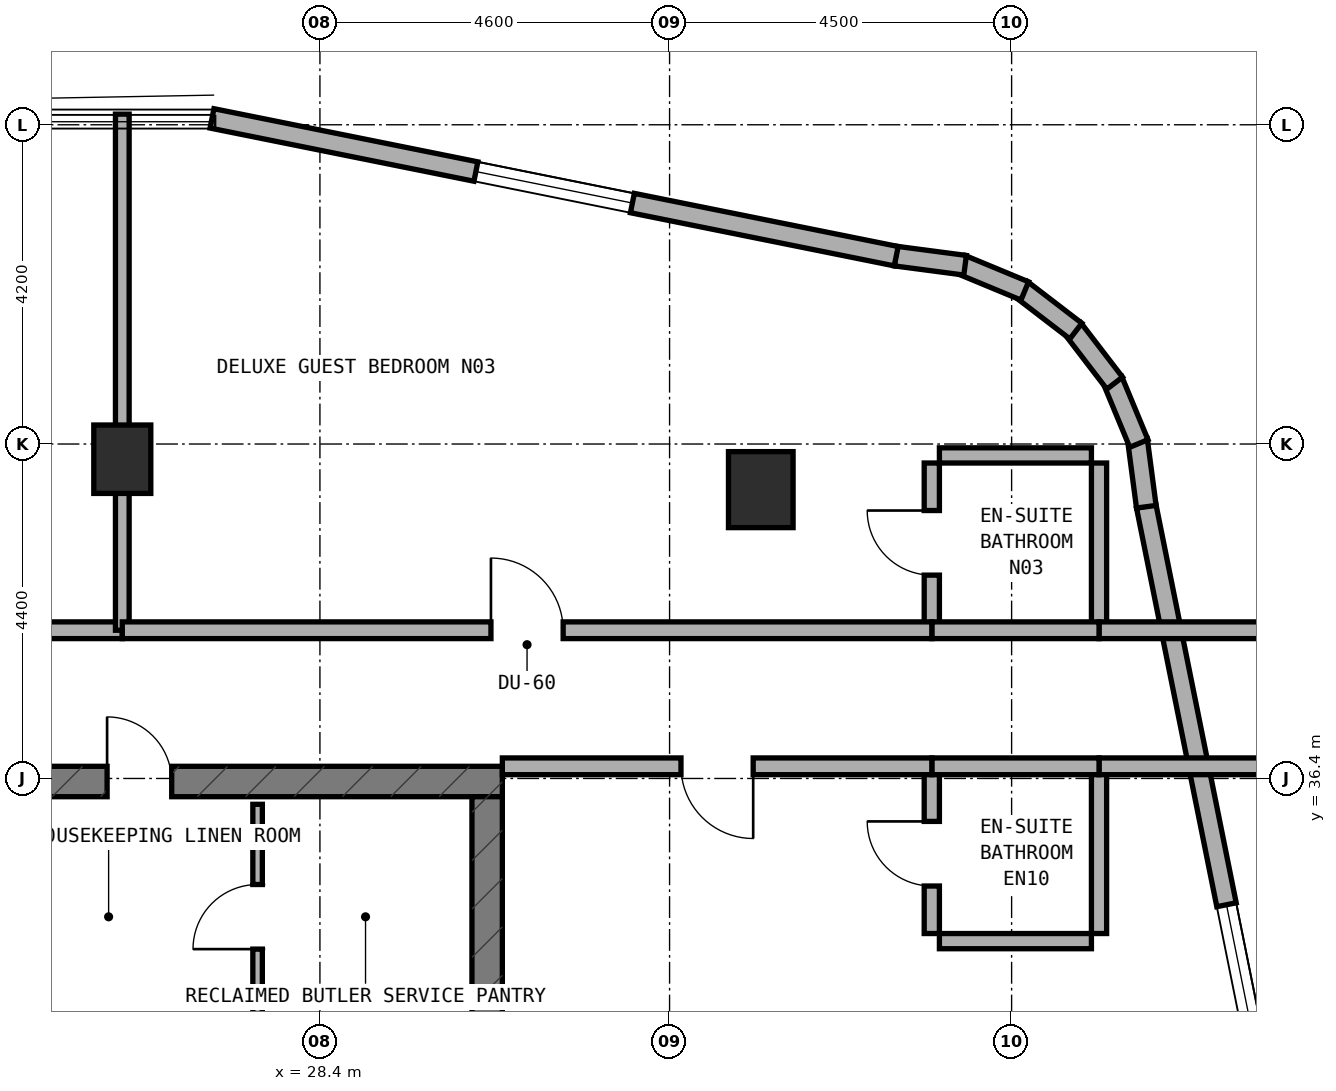
"""IFC4 building model, lengths in metres.
Left out: names, types, materials, properties, quantities, classifications, styles, units other than length and angle.
Written with IfcOpenShell. Run it as: python <this file> out.ifc"""

import sys

from ifc_helpers import new_model, si_unit, direction, frame, frame_2d, origin, origin_2d, place, context, subcontext, project, spatial, rectangle, extrude, element, fill, save


model = new_model("IFC4")
c1 = context("Model", 3, precision=1e-05, world=origin(), true_north=direction((0.0, 1.0)))
c2 = subcontext(c1, "Body", "Model", "MODEL_VIEW")
j1 = project(units=[si_unit("LENGTHUNIT", "METRE"), si_unit("PLANEANGLEUNIT", "RADIAN")], contexts=[c1])
p1 = place(None, origin())
s1 = spatial("IfcSite", under=j1, at=p1, CompositionType="ELEMENT")
p2 = place(p1, origin())
s2 = spatial("IfcBuilding", under=s1, at=p2, CompositionType="ELEMENT")
p3 = place(p2, frame((0.0, 0.0, 145.0)))
s3 = spatial("IfcBuildingStorey", under=s2, at=p3, CompositionType="ELEMENT", Elevation=145.0)
p4 = place(p3, frame((6.4, 36.36, 0.0), z_axis=(0.0, 0.0, 1.0), x_axis=(1.0, 0.0, 0.0)))
e1 = element("IfcWall", 1, at=p4, inside=s3, PredefinedType="SHEAR", context=c2, shape_type="SweptSolid", body=[
    extrude(rectangle(XDim=24.4, YDim=0.4, at=frame_2d((12.2, 0.0))), origin(), (0.0, 0.0, 1.0), 3.5),
])
p5 = place(p4, frame((9.15, 0.0, 0.0)))
e2 = element("IfcOpeningElement", 2, at=p5, cuts=e1, PredefinedType="OPENING", context=c2, shape_type="SweptSolid", body=[
    extrude(rectangle(XDim=1.2, YDim=2.15, at=frame_2d((0.6, 1.075))), frame((0.0, 0.21, 0.0), z_axis=(0.0, -1.0, 0.0), x_axis=(1.0, 0.0, 0.0)), (0.0, 0.0, 1.0), 0.42),
])
p6 = place(p4, frame((19.2, 0.0, 0.0)))
e3 = element("IfcOpeningElement", 3, at=p6, cuts=e1, PredefinedType="OPENING", context=c2, shape_type="SweptSolid", body=[
    extrude(rectangle(XDim=0.85, YDim=2.1, at=frame_2d((0.425, 1.05))), frame((0.0, 0.21, 0.0), z_axis=(0.0, -1.0, 0.0), x_axis=(1.0, 0.0, 0.0)), (0.0, 0.0, 1.0), 0.42),
])
p7 = place(p4, frame((17.22, 0.0, 0.0)))
e4 = element("IfcOpeningElement", 4, at=p7, cuts=e1, PredefinedType="OPENING", context=c2, shape_type="SweptSolid", body=[
    extrude(rectangle(XDim=0.85, YDim=2.1, at=frame_2d((0.425, 1.05))), frame((0.0, 0.21, 0.0), z_axis=(0.0, -1.0, 0.0), x_axis=(1.0, 0.0, 0.0)), (0.0, 0.0, 1.0), 0.42),
])
p8 = place(p3, frame((30.6, 33.0, 0.0), z_axis=(0.0, 0.0, 1.0), x_axis=(0.0, 1.0, 0.0)))
e5 = element("IfcWall", 5, at=p8, inside=s3, PredefinedType="SHEAR", context=c2, shape_type="SweptSolid", body=[
    extrude(rectangle(XDim=3.16, YDim=0.4, at=frame_2d((1.58, 0.0))), origin(), (0.0, 0.0, 1.0), 3.5),
])
p9 = place(p3, frame((25.8, 40.6, 0.0), z_axis=(0.0, 0.0, 1.0), x_axis=(1.0, 0.0, 0.0)))
e6 = element("IfcColumn", 6, at=p9, inside=s3, PredefinedType="COLUMN", context=c2, shape_type="SweptSolid", body=[
    extrude(rectangle(XDim=0.75, YDim=0.9, at=origin_2d()), origin(), (0.0, 0.0, 1.0), 3.5),
])
p10 = place(p3, frame((34.2, 40.2, 0.0), z_axis=(0.0, 0.0, 1.0), x_axis=(1.0, 0.0, 0.0)))
e7 = element("IfcColumn", 7, at=p10, inside=s3, PredefinedType="COLUMN", context=c2, shape_type="SweptSolid", body=[
    extrude(rectangle(XDim=0.85, YDim=1.0, at=origin_2d()), origin(), (0.0, 0.0, 1.0), 3.5),
])
p11 = place(p3, frame((41.084, 30.98, 0.0), z_axis=(0.0, 0.0, 1.0), x_axis=(-0.197435082048, 0.980315963543, 0.0)))
e8 = element("IfcWall", 8, at=p11, inside=s3, PredefinedType="STANDARD", context=c2, shape_type="SweptSolid", body=[
    extrude(rectangle(XDim=9.183, YDim=0.26, at=frame_2d((4.591, 0.0))), origin(), (0.0, 0.0, 1.0), 3.22),
])
p12 = place(p11, frame((1.734, 0.0, 0.85)))
e9 = element("IfcOpeningElement", 9, at=p12, cuts=e8, PredefinedType="OPENING", context=c2, shape_type="SweptSolid", body=[
    extrude(rectangle(XDim=2.1, YDim=1.5, at=frame_2d((1.05, 0.75))), frame((0.0, 0.14, 0.0), z_axis=(0.0, -1.0, 0.0), x_axis=(1.0, 0.0, 0.0)), (0.0, 0.0, 1.0), 0.28),
])
p13 = place(p3, frame((39.272, 39.975, 0.0), z_axis=(0.0, 0.0, 1.0), x_axis=(-0.130953706898, 0.991388484223, 0.0)))
e10 = element("IfcWall", 10, at=p13, inside=s3, PredefinedType="STANDARD", context=c2, shape_type="SweptSolid", body=[
    extrude(rectangle(XDim=0.885, YDim=0.26, at=frame_2d((0.443, 0.0))), origin(), (0.0, 0.0, 1.0), 3.22),
])
p14 = place(p3, frame((39.174, 40.807, 0.0), z_axis=(0.0, 0.0, 1.0), x_axis=(-0.383290660547, 0.923627776508, 0.0)))
e11 = element("IfcWall", 11, at=p14, inside=s3, PredefinedType="STANDARD", context=c2, shape_type="SweptSolid", body=[
    extrude(rectangle(XDim=0.903, YDim=0.26, at=frame_2d((0.452, 0.0))), origin(), (0.0, 0.0, 1.0), 3.22),
])
p15 = place(p3, frame((38.856, 41.601, 0.0), z_axis=(0.0, 0.0, 1.0), x_axis=(-0.608624690463, 0.793458244748, 0.0)))
e12 = element("IfcWall", 12, at=p15, inside=s3, PredefinedType="STANDARD", context=c2, shape_type="SweptSolid", body=[
    extrude(rectangle(XDim=0.902, YDim=0.26, at=frame_2d((0.451, 0.0))), origin(), (0.0, 0.0, 1.0), 3.22),
])
p16 = place(p3, frame((38.345, 42.286, 0.0), z_axis=(0.0, 0.0, 1.0), x_axis=(-0.793558456666, 0.608494022858, 0.0)))
e13 = element("IfcWall", 13, at=p16, inside=s3, PredefinedType="STANDARD", context=c2, shape_type="SweptSolid", body=[
    extrude(rectangle(XDim=0.902, YDim=0.26, at=frame_2d((0.451, 0.0))), origin(), (0.0, 0.0, 1.0), 3.22),
])
p17 = place(p3, frame((37.673, 42.814, 0.0), z_axis=(0.0, 0.0, 1.0), x_axis=(-0.923683767999, 0.383155708213, 0.0)))
e14 = element("IfcWall", 14, at=p17, inside=s3, PredefinedType="STANDARD", context=c2, shape_type="SweptSolid", body=[
    extrude(rectangle(XDim=0.903, YDim=0.26, at=frame_2d((0.451, 0.0))), origin(), (0.0, 0.0, 1.0), 3.22),
])
p18 = place(p3, frame((36.888, 43.152, 0.0), z_axis=(0.0, 0.0, 1.0), x_axis=(-0.991487658083, 0.130200706103, 0.0)))
e15 = element("IfcWall", 15, at=p18, inside=s3, PredefinedType="STANDARD", context=c2, shape_type="SweptSolid", body=[
    extrude(rectangle(XDim=0.921, YDim=0.26, at=frame_2d((0.46, 0.0))), origin(), (0.0, 0.0, 1.0), 3.22),
])
p19 = place(p3, frame((35.982, 43.271, 0.0), z_axis=(0.0, 0.0, 1.0), x_axis=(-0.980315963543, 0.197435082048, 0.0)))
e16 = element("IfcWall", 16, at=p19, inside=s3, PredefinedType="STANDARD", context=c2, shape_type="SweptSolid", body=[
    extrude(rectangle(XDim=9.183, YDim=0.26, at=frame_2d((4.591, 0.0))), origin(), (0.0, 0.0, 1.0), 3.22),
])
p20 = place(p19, frame((3.541, 0.0, 0.85)))
e17 = element("IfcOpeningElement", 17, at=p20, cuts=e16, PredefinedType="OPENING", context=c2, shape_type="SweptSolid", body=[
    extrude(rectangle(XDim=2.1, YDim=1.5, at=frame_2d((1.05, 0.75))), frame((0.0, 0.14, 0.0), z_axis=(0.0, -1.0, 0.0), x_axis=(1.0, 0.0, 0.0)), (0.0, 0.0, 1.0), 0.28),
])
p21 = place(p3, frame((27.58, 33.1, 0.0), z_axis=(0.0, 0.0, 1.0), x_axis=(0.0, 1.0, 0.0)))
e18 = element("IfcWall", 18, at=p21, inside=s3, PredefinedType="PARTITIONING", context=c2, shape_type="SweptSolid", body=[
    extrude(rectangle(XDim=2.96, YDim=0.125, at=frame_2d((1.48, 0.0))), origin(), (0.0, 0.0, 1.0), 2.795),
])
p22 = place(p21, frame((1.055, 0.0, 0.0)))
e19 = element("IfcOpeningElement", 19, at=p22, cuts=e18, PredefinedType="OPENING", context=c2, shape_type="SweptSolid", body=[
    extrude(rectangle(XDim=0.85, YDim=2.1, at=frame_2d((0.425, 1.05))), frame((0.0, 0.073, 0.0), z_axis=(0.0, -1.0, 0.0), x_axis=(1.0, 0.0, 0.0)), (0.0, 0.0, 1.0), 0.145),
])
p23 = place(p3, frame((18.4, 38.35, 0.0), z_axis=(0.0, 0.0, 1.0), x_axis=(1.0, 0.0, 0.0)))
e20 = element("IfcWall", 20, at=p23, inside=s3, PredefinedType="SOLIDWALL", context=c2, shape_type="SweptSolid", body=[
    extrude(rectangle(XDim=7.4, YDim=0.22, at=frame_2d((3.7, 0.0))), origin(), (0.0, 0.0, 1.0), 2.795),
])
p24 = place(p23, frame((3.225, 0.0, 0.0)))
e21 = element("IfcOpeningElement", 21, at=p24, cuts=e20, PredefinedType="OPENING", context=c2, shape_type="SweptSolid", body=[
    extrude(rectangle(XDim=0.95, YDim=2.1, at=frame_2d((0.475, 1.05))), frame((0.0, 0.12, 0.0), z_axis=(0.0, -1.0, 0.0), x_axis=(1.0, 0.0, 0.0)), (0.0, 0.0, 1.0), 0.24),
])
p25 = place(p3, frame((25.8, 38.35, 0.0), z_axis=(0.0, 0.0, 1.0), x_axis=(0.0, 1.0, 0.0)))
e22 = element("IfcWall", 22, at=p25, inside=s3, PredefinedType="SOLIDWALL", context=c2, shape_type="SweptSolid", body=[
    extrude(rectangle(XDim=6.79, YDim=0.18, at=frame_2d((3.395, 0.0))), origin(), (0.0, 0.0, 1.0), 2.795),
])
p26 = place(p3, frame((36.45, 38.45, 0.0), z_axis=(0.0, 0.0, 1.0), x_axis=(0.0, 1.0, 0.0)))
e23 = element("IfcWall", 23, at=p26, inside=s3, PredefinedType="PLUMBINGWALL", context=c2, shape_type="SweptSolid", body=[
    extrude(rectangle(XDim=2.1, YDim=0.2, at=frame_2d((1.05, 0.0))), origin(), (0.0, 0.0, 1.0), 3.22),
])
p27 = place(p26, frame((0.625, 0.0, 0.0)))
e24 = element("IfcOpeningElement", 24, at=p27, cuts=e23, PredefinedType="OPENING", context=c2, shape_type="SweptSolid", body=[
    extrude(rectangle(XDim=0.85, YDim=2.1, at=frame_2d((0.425, 1.05))), frame((0.0, 0.11, 0.0), z_axis=(0.0, -1.0, 0.0), x_axis=(1.0, 0.0, 0.0)), (0.0, 0.0, 1.0), 0.22),
])
p28 = place(p3, frame((36.55, 40.65, 0.0), z_axis=(0.0, 0.0, 1.0), x_axis=(1.0, 0.0, 0.0)))
e25 = element("IfcWall", 25, at=p28, inside=s3, PredefinedType="PLUMBINGWALL", context=c2, shape_type="SweptSolid", body=[
    extrude(rectangle(XDim=2.0, YDim=0.2, at=frame_2d((1.0, 0.0))), origin(), (0.0, 0.0, 1.0), 3.22),
])
p29 = place(p3, frame((38.65, 38.45, 0.0), z_axis=(0.0, 0.0, 1.0), x_axis=(0.0, 1.0, 0.0)))
e26 = element("IfcWall", 26, at=p29, inside=s3, PredefinedType="PLUMBINGWALL", context=c2, shape_type="SweptSolid", body=[
    extrude(rectangle(XDim=2.1, YDim=0.2, at=frame_2d((1.05, 0.0))), origin(), (0.0, 0.0, 1.0), 3.22),
])
p30 = place(p3, frame((38.65, 38.35, 0.0), z_axis=(0.0, 0.0, 1.0), x_axis=(1.0, 0.0, 0.0)))
e27 = element("IfcWall", 27, at=p30, inside=s3, PredefinedType="SOLIDWALL", context=c2, shape_type="SweptSolid", body=[
    extrude(rectangle(XDim=2.39, YDim=0.22, at=frame_2d((1.195, 0.0))), origin(), (0.0, 0.0, 1.0), 3.22),
])
p31 = place(p3, frame((36.45, 38.35, 0.0), z_axis=(0.0, 0.0, 1.0), x_axis=(1.0, 0.0, 0.0)))
e28 = element("IfcWall", 28, at=p31, inside=s3, PredefinedType="SOLIDWALL", context=c2, shape_type="SweptSolid", body=[
    extrude(rectangle(XDim=2.2, YDim=0.22, at=frame_2d((1.1, 0.0))), origin(), (0.0, 0.0, 1.0), 3.22),
])
p32 = place(p3, frame((25.8, 38.35, 0.0), z_axis=(0.0, 0.0, 1.0), x_axis=(1.0, 0.0, 0.0)))
e29 = element("IfcWall", 29, at=p32, inside=s3, PredefinedType="SOLIDWALL", context=c2, shape_type="SweptSolid", body=[
    extrude(rectangle(XDim=10.65, YDim=0.22, at=frame_2d((5.325, 0.0))), origin(), (0.0, 0.0, 1.0), 2.795),
])
p33 = place(p32, frame((4.85, 0.0, 0.0)))
e30 = element("IfcOpeningElement", 30, at=p33, cuts=e29, PredefinedType="OPENING", context=c2, shape_type="SweptSolid", body=[
    extrude(rectangle(XDim=0.95, YDim=2.1, at=frame_2d((0.475, 1.05))), frame((0.0, 0.12, 0.0), z_axis=(0.0, -1.0, 0.0), x_axis=(1.0, 0.0, 0.0)), (0.0, 0.0, 1.0), 0.24),
])
p34 = place(p3, frame((36.45, 34.36, 0.0), z_axis=(0.0, 0.0, 1.0), x_axis=(0.0, 1.0, 0.0)))
e31 = element("IfcWall", 31, at=p34, inside=s3, PredefinedType="PLUMBINGWALL", context=c2, shape_type="SweptSolid", body=[
    extrude(rectangle(XDim=2.1, YDim=0.2, at=frame_2d((1.05, 0.0))), origin(), (0.0, 0.0, 1.0), 3.22),
])
p35 = place(p34, frame((0.625, 0.0, 0.0)))
e32 = element("IfcOpeningElement", 32, at=p35, cuts=e31, PredefinedType="OPENING", context=c2, shape_type="SweptSolid", body=[
    extrude(rectangle(XDim=0.85, YDim=2.1, at=frame_2d((0.425, 1.05))), frame((0.0, 0.11, 0.0), z_axis=(0.0, -1.0, 0.0), x_axis=(1.0, 0.0, 0.0)), (0.0, 0.0, 1.0), 0.22),
])
p36 = place(p3, frame((36.55, 34.26, 0.0), z_axis=(0.0, 0.0, 1.0), x_axis=(1.0, 0.0, 0.0)))
e33 = element("IfcWall", 33, at=p36, inside=s3, PredefinedType="PLUMBINGWALL", context=c2, shape_type="SweptSolid", body=[
    extrude(rectangle(XDim=2.0, YDim=0.2, at=frame_2d((1.0, 0.0))), origin(), (0.0, 0.0, 1.0), 3.22),
])
p37 = place(p3, frame((38.65, 34.36, 0.0), z_axis=(0.0, 0.0, 1.0), x_axis=(0.0, 1.0, 0.0)))
e34 = element("IfcWall", 34, at=p37, inside=s3, PredefinedType="PLUMBINGWALL", context=c2, shape_type="SweptSolid", body=[
    extrude(rectangle(XDim=2.1, YDim=0.2, at=frame_2d((1.05, 0.0))), origin(), (0.0, 0.0, 1.0), 3.22),
])
p38 = place(p3, frame((38.65, 36.56, 0.0), z_axis=(0.0, 0.0, 1.0), x_axis=(1.0, 0.0, 0.0)))
e35 = element("IfcWall", 35, at=p38, inside=s3, PredefinedType="SOLIDWALL", context=c2, shape_type="SweptSolid", body=[
    extrude(rectangle(XDim=2.55, YDim=0.22, at=frame_2d((1.275, 0.0))), origin(), (0.0, 0.0, 1.0), 3.22),
])
p39 = place(p3, frame((36.45, 36.56, 0.0), z_axis=(0.0, 0.0, 1.0), x_axis=(1.0, 0.0, 0.0)))
e36 = element("IfcWall", 36, at=p39, inside=s3, PredefinedType="SOLIDWALL", context=c2, shape_type="SweptSolid", body=[
    extrude(rectangle(XDim=2.2, YDim=0.22, at=frame_2d((1.1, 0.0))), origin(), (0.0, 0.0, 1.0), 3.22),
])
p40 = place(p3, frame((30.8, 36.56, 0.0), z_axis=(0.0, 0.0, 1.0), x_axis=(1.0, 0.0, 0.0)))
e37 = element("IfcWall", 37, at=p40, inside=s3, PredefinedType="SOLIDWALL", context=c2, shape_type="SweptSolid", body=[
    extrude(rectangle(XDim=5.65, YDim=0.22, at=frame_2d((2.825, 0.0))), origin(), (0.0, 0.0, 1.0), 2.795),
])
p41 = place(p40, frame((2.35, 0.0, 0.0)))
e38 = element("IfcOpeningElement", 38, at=p41, cuts=e37, PredefinedType="OPENING", context=c2, shape_type="SweptSolid", body=[
    extrude(rectangle(XDim=0.95, YDim=2.1, at=frame_2d((0.475, 1.05))), frame((0.0, 0.12, 0.0), z_axis=(0.0, -1.0, 0.0), x_axis=(1.0, 0.0, 0.0)), (0.0, 0.0, 1.0), 0.24),
])
p42 = place(p12, origin())
e39 = element("IfcWindow", 39, at=p42, inside=s3, PartitioningType="SINGLE_PANEL", PredefinedType="WINDOW", context=c2, shape_type="SweptSolid", body=[
    extrude(rectangle(XDim=2.1, YDim=1.5, at=frame_2d((1.05, 0.75))), frame((0.0, 0.03, 0.0), z_axis=(0.0, -1.0, 0.0), x_axis=(1.0, 0.0, 0.0)), (0.0, 0.0, 1.0), 0.06),
])
fill(e9, e39)
p43 = place(p20, origin())
e40 = element("IfcWindow", 40, at=p43, inside=s3, PartitioningType="SINGLE_PANEL", PredefinedType="WINDOW", context=c2, shape_type="SweptSolid", body=[
    extrude(rectangle(XDim=2.1, YDim=1.5, at=frame_2d((1.05, 0.75))), frame((0.0, 0.03, 0.0), z_axis=(0.0, -1.0, 0.0), x_axis=(1.0, 0.0, 0.0)), (0.0, 0.0, 1.0), 0.06),
])
fill(e17, e40)
p44 = place(p6, origin())
e41 = element("IfcDoor", 41, at=p44, inside=s3, OperationType="SINGLE_SWING_LEFT", PredefinedType="DOOR", context=c2, shape_type="SweptSolid", body=[
    extrude(rectangle(XDim=0.85, YDim=2.1, at=frame_2d((0.425, 1.05))), frame((0.0, 0.025, 0.0), z_axis=(0.0, -1.0, 0.0), x_axis=(1.0, 0.0, 0.0)), (0.0, 0.0, 1.0), 0.05),
])
fill(e3, e41)
p45 = place(p22, origin())
e42 = element("IfcDoor", 42, at=p45, inside=s3, OperationType="SINGLE_SWING_LEFT", PredefinedType="DOOR", context=c2, shape_type="SweptSolid", body=[
    extrude(rectangle(XDim=0.85, YDim=2.1, at=frame_2d((0.425, 1.05))), frame((0.0, 0.025, 0.0), z_axis=(0.0, -1.0, 0.0), x_axis=(1.0, 0.0, 0.0)), (0.0, 0.0, 1.0), 0.05),
])
fill(e19, e42)
p46 = place(p27, origin())
e43 = element("IfcDoor", 43, at=p46, inside=s3, OperationType="SINGLE_SWING_RIGHT", PredefinedType="DOOR", context=c2, shape_type="SweptSolid", body=[
    extrude(rectangle(XDim=0.85, YDim=2.1, at=frame_2d((0.425, 1.05))), frame((0.0, 0.025, 0.0), z_axis=(0.0, -1.0, 0.0), x_axis=(1.0, 0.0, 0.0)), (0.0, 0.0, 1.0), 0.05),
])
fill(e24, e43)
p47 = place(p33, origin())
e44 = element("IfcDoor", 44, at=p47, inside=s3, OperationType="SINGLE_SWING_LEFT", PredefinedType="DOOR", context=c2, shape_type="SweptSolid", body=[
    extrude(rectangle(XDim=0.95, YDim=2.1, at=frame_2d((0.475, 1.05))), frame((0.0, 0.025, 0.0), z_axis=(0.0, -1.0, 0.0), x_axis=(1.0, 0.0, 0.0)), (0.0, 0.0, 1.0), 0.05),
])
fill(e30, e44)
p48 = place(p35, origin())
e45 = element("IfcDoor", 45, at=p48, inside=s3, OperationType="SINGLE_SWING_RIGHT", PredefinedType="DOOR", context=c2, shape_type="SweptSolid", body=[
    extrude(rectangle(XDim=0.85, YDim=2.1, at=frame_2d((0.425, 1.05))), frame((0.0, 0.025, 0.0), z_axis=(0.0, -1.0, 0.0), x_axis=(1.0, 0.0, 0.0)), (0.0, 0.0, 1.0), 0.05),
])
fill(e32, e45)
p49 = place(p41, frame((0.95, 0.0, 0.0), z_axis=(0.0, 0.0, 1.0), x_axis=(-1.0, 0.0, 0.0)))
e46 = element("IfcDoor", 46, at=p49, inside=s3, OperationType="SINGLE_SWING_LEFT", PredefinedType="DOOR", context=c2, shape_type="SweptSolid", body=[
    extrude(rectangle(XDim=0.95, YDim=2.1, at=frame_2d((0.475, 1.05))), frame((0.0, 0.025, 0.0), z_axis=(0.0, -1.0, 0.0), x_axis=(1.0, 0.0, 0.0)), (0.0, 0.0, 1.0), 0.05),
])
fill(e38, e46)
save(model, sys.argv[1])
